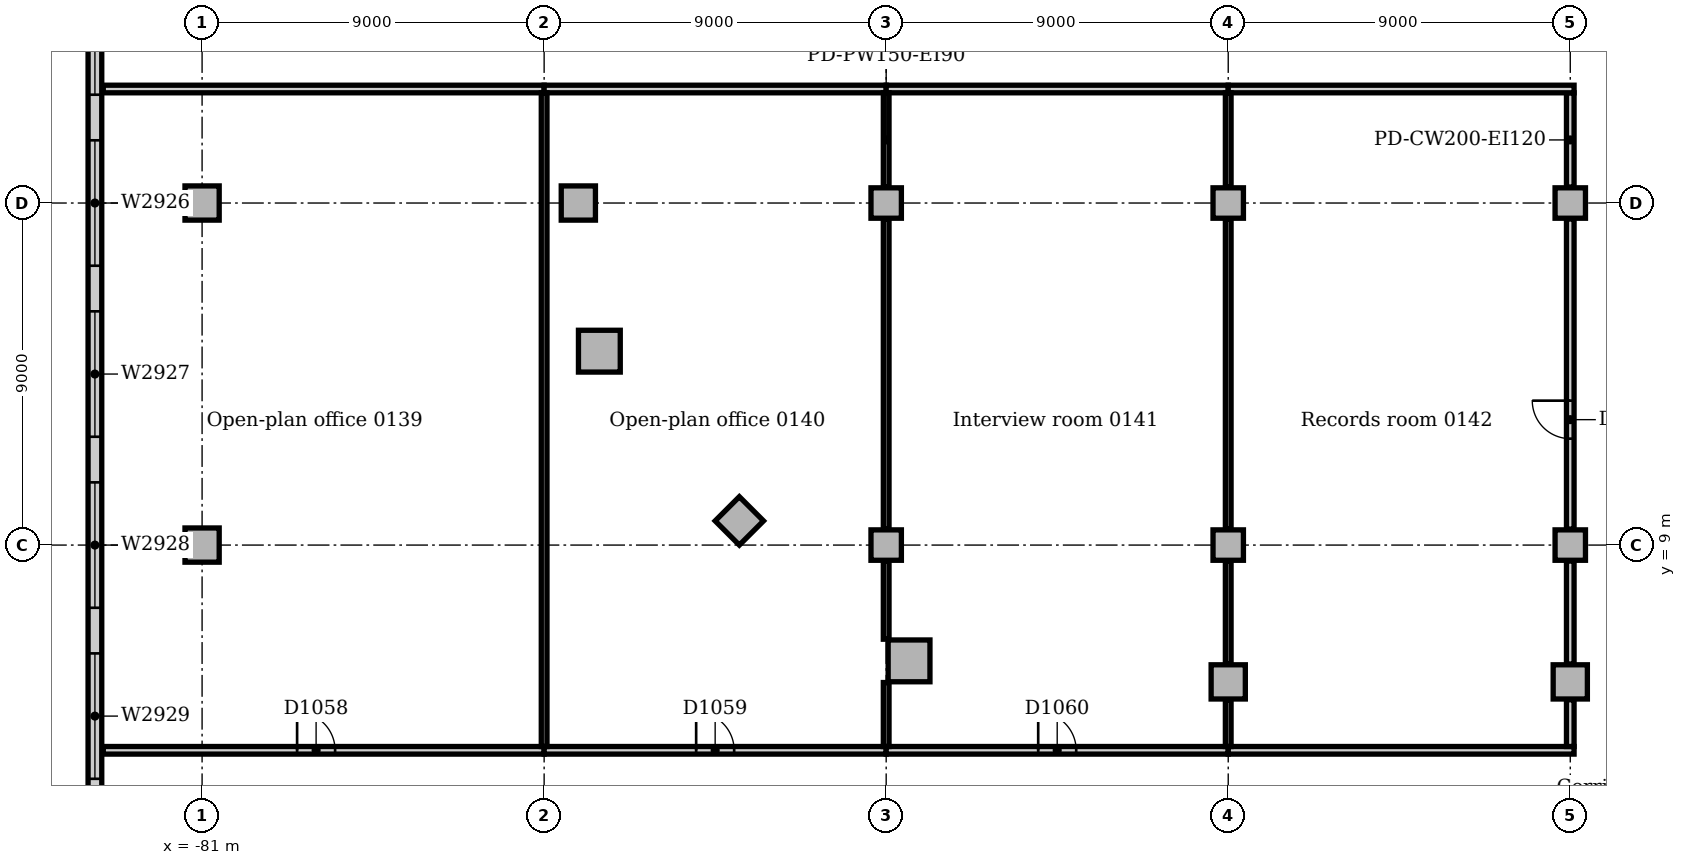
"""IFC4 building model, lengths in metres.
Left out: names, types, materials, properties, quantities, classifications, styles, units other than length and angle.
Written with IfcOpenShell. Run it as: python <this file> out.ifc"""

import sys

from ifc_helpers import new_model, si_unit, direction, frame, frame_2d, origin, origin_2d, place, context, subcontext, project, spatial, rectangle, extrude, element, fill, save


model = new_model("IFC4")
c1 = context("Model", 3, precision=1e-05, world=origin(), true_north=direction((0.0, 1.0)))
c2 = subcontext(c1, "Body", "Model", "MODEL_VIEW")
j1 = project(units=[si_unit("LENGTHUNIT", "METRE"), si_unit("PLANEANGLEUNIT", "RADIAN")], contexts=[c1])
p1 = place(None, origin())
s1 = spatial("IfcSite", under=j1, at=p1, CompositionType="ELEMENT")
p2 = place(p1, origin())
s2 = spatial("IfcBuilding", under=s1, at=p2, CompositionType="ELEMENT")
p3 = place(p2, frame((0.0, 0.0, 6.0)))
s3 = spatial("IfcBuildingStorey", under=s2, at=p3, CompositionType="ELEMENT", Elevation=6.0)
for number, where, z_axis, x_axis in (
    (1, (-62.398, 5.953, 0.0), (0.0, 0.0, 1.0), (1.0, 0.0, 0.0)),
    (2, (-70.547, 14.102, 0.0), (0.0, 0.0, 1.0), (1.0, 0.0, 0.0)),
):
    element("IfcColumn", number, at=place(p3, frame(where, z_axis=z_axis, x_axis=x_axis)), inside=s3, PredefinedType="COLUMN", context=c2, shape_type="SweptSolid", body=[
        extrude(rectangle(XDim=1.1, YDim=1.1, at=origin_2d()), origin(), (0.0, 0.0, 1.0), 4.7),
    ])
for number, where, z_axis, x_axis in (
    (3, (-54.0, 5.4, 0.0), (0.0, 0.0, 1.0), (1.0, 0.0, 0.0)),
    (4, (-45.0, 5.4, 0.0), (0.0, 0.0, 1.0), (1.0, 0.0, 0.0)),
    (5, (-71.1, 18.0, 0.0), (0.0, 0.0, 1.0), (1.0, 0.0, 0.0)),
    (6, (-66.864, 9.636, 0.0), (0.0, 0.0, 1.0), (0.707, 0.707, 0.0)),
):
    element("IfcColumn", number, at=place(p3, frame(where, z_axis=z_axis, x_axis=x_axis)), inside=s3, PredefinedType="COLUMN", context=c2, shape_type="SweptSolid", body=[
        extrude(rectangle(XDim=0.9, YDim=0.9, at=origin_2d()), origin(), (0.0, 0.0, 1.0), 4.7),
    ])
for number, where, z_axis, x_axis in (
    (7, (-63.0, 9.0, 0.0), (0.0, 0.0, 1.0), (1.0, 0.0, 0.0)),
    (8, (-63.0, 18.0, 0.0), (0.0, 0.0, 1.0), (1.0, 0.0, 0.0)),
    (9, (-54.0, 9.0, 0.0), (0.0, 0.0, 1.0), (1.0, 0.0, 0.0)),
    (10, (-54.0, 18.0, 0.0), (0.0, 0.0, 1.0), (1.0, 0.0, 0.0)),
    (11, (-45.0, 9.0, 0.0), (0.0, 0.0, 1.0), (1.0, 0.0, 0.0)),
    (12, (-45.0, 18.0, 0.0), (0.0, 0.0, 1.0), (1.0, 0.0, 0.0)),
):
    element("IfcColumn", number, at=place(p3, frame(where, z_axis=z_axis, x_axis=x_axis)), inside=s3, PredefinedType="COLUMN", context=c2, shape_type="SweptSolid", body=[
        extrude(rectangle(XDim=0.8, YDim=0.8, at=origin_2d()), origin(), (0.0, 0.0, 1.0), 4.7),
    ])
for number, where, z_axis, x_axis in (
    (13, (-81.0, 9.0, 0.0), (0.0, 0.0, 1.0), (1.0, 0.0, 0.0)),
    (14, (-81.0, 18.0, 0.0), (0.0, 0.0, 1.0), (1.0, 0.0, 0.0)),
):
    element("IfcColumn", number, at=place(p3, frame(where, z_axis=z_axis, x_axis=x_axis)), inside=s3, PredefinedType="COLUMN", context=c2, shape_type="SweptSolid", body=[
        extrude(rectangle(XDim=0.9, YDim=0.9, at=origin_2d()), origin(), (0.0, 0.0, 1.0), 4.7),
    ])
p4 = place(p3, frame((-83.82, 54.0, 0.0), z_axis=(0.0, 0.0, 1.0), x_axis=(0.0, -1.0, 0.0)))
e15 = element("IfcWall", 15, at=p4, inside=s3, PredefinedType="STANDARD", context=c2, shape_type="SweptSolid", body=[
    extrude(rectangle(XDim=63.0, YDim=0.36, at=frame_2d((31.5, 0.0))), origin(), (0.0, 0.0, 1.0), 4.7),
])
p5 = place(p4, frame((2.85, 0.0, 0.9)))
e16 = element("IfcOpeningElement", 16, at=p5, cuts=e15, PredefinedType="OPENING", context=c2, shape_type="SweptSolid", body=[
    extrude(rectangle(XDim=3.3, YDim=2.4, at=frame_2d((1.65, 1.2))), frame((0.0, 0.19, 0.0), z_axis=(0.0, -1.0, 0.0), x_axis=(1.0, 0.0, 0.0)), (0.0, 0.0, 1.0), 0.38),
])
p6 = place(p4, frame((7.35, 0.0, 0.9)))
e17 = element("IfcOpeningElement", 17, at=p6, cuts=e15, PredefinedType="OPENING", context=c2, shape_type="SweptSolid", body=[
    extrude(rectangle(XDim=3.3, YDim=2.4, at=frame_2d((1.65, 1.2))), frame((0.0, 0.19, 0.0), z_axis=(0.0, -1.0, 0.0), x_axis=(1.0, 0.0, 0.0)), (0.0, 0.0, 1.0), 0.38),
])
p7 = place(p4, frame((11.85, 0.0, 0.9)))
e18 = element("IfcOpeningElement", 18, at=p7, cuts=e15, PredefinedType="OPENING", context=c2, shape_type="SweptSolid", body=[
    extrude(rectangle(XDim=3.3, YDim=2.4, at=frame_2d((1.65, 1.2))), frame((0.0, 0.19, 0.0), z_axis=(0.0, -1.0, 0.0), x_axis=(1.0, 0.0, 0.0)), (0.0, 0.0, 1.0), 0.38),
])
p8 = place(p4, frame((16.35, 0.0, 0.9)))
e19 = element("IfcOpeningElement", 19, at=p8, cuts=e15, PredefinedType="OPENING", context=c2, shape_type="SweptSolid", body=[
    extrude(rectangle(XDim=3.3, YDim=2.4, at=frame_2d((1.65, 1.2))), frame((0.0, 0.19, 0.0), z_axis=(0.0, -1.0, 0.0), x_axis=(1.0, 0.0, 0.0)), (0.0, 0.0, 1.0), 0.38),
])
p9 = place(p4, frame((20.85, 0.0, 0.9)))
e20 = element("IfcOpeningElement", 20, at=p9, cuts=e15, PredefinedType="OPENING", context=c2, shape_type="SweptSolid", body=[
    extrude(rectangle(XDim=3.3, YDim=2.4, at=frame_2d((1.65, 1.2))), frame((0.0, 0.19, 0.0), z_axis=(0.0, -1.0, 0.0), x_axis=(1.0, 0.0, 0.0)), (0.0, 0.0, 1.0), 0.38),
])
p10 = place(p4, frame((25.35, 0.0, 0.9)))
e21 = element("IfcOpeningElement", 21, at=p10, cuts=e15, PredefinedType="OPENING", context=c2, shape_type="SweptSolid", body=[
    extrude(rectangle(XDim=3.3, YDim=2.4, at=frame_2d((1.65, 1.2))), frame((0.0, 0.19, 0.0), z_axis=(0.0, -1.0, 0.0), x_axis=(1.0, 0.0, 0.0)), (0.0, 0.0, 1.0), 0.38),
])
p11 = place(p4, frame((29.85, 0.0, 0.9)))
e22 = element("IfcOpeningElement", 22, at=p11, cuts=e15, PredefinedType="OPENING", context=c2, shape_type="SweptSolid", body=[
    extrude(rectangle(XDim=3.3, YDim=2.4, at=frame_2d((1.65, 1.2))), frame((0.0, 0.19, 0.0), z_axis=(0.0, -1.0, 0.0), x_axis=(1.0, 0.0, 0.0)), (0.0, 0.0, 1.0), 0.38),
])
p12 = place(p4, frame((34.35, 0.0, 0.9)))
e23 = element("IfcOpeningElement", 23, at=p12, cuts=e15, PredefinedType="OPENING", context=c2, shape_type="SweptSolid", body=[
    extrude(rectangle(XDim=3.3, YDim=2.4, at=frame_2d((1.65, 1.2))), frame((0.0, 0.19, 0.0), z_axis=(0.0, -1.0, 0.0), x_axis=(1.0, 0.0, 0.0)), (0.0, 0.0, 1.0), 0.38),
])
p13 = place(p4, frame((38.85, 0.0, 0.9)))
e24 = element("IfcOpeningElement", 24, at=p13, cuts=e15, PredefinedType="OPENING", context=c2, shape_type="SweptSolid", body=[
    extrude(rectangle(XDim=3.3, YDim=2.4, at=frame_2d((1.65, 1.2))), frame((0.0, 0.19, 0.0), z_axis=(0.0, -1.0, 0.0), x_axis=(1.0, 0.0, 0.0)), (0.0, 0.0, 1.0), 0.38),
])
p14 = place(p4, frame((43.35, 0.0, 0.9)))
e25 = element("IfcOpeningElement", 25, at=p14, cuts=e15, PredefinedType="OPENING", context=c2, shape_type="SweptSolid", body=[
    extrude(rectangle(XDim=3.3, YDim=2.4, at=frame_2d((1.65, 1.2))), frame((0.0, 0.19, 0.0), z_axis=(0.0, -1.0, 0.0), x_axis=(1.0, 0.0, 0.0)), (0.0, 0.0, 1.0), 0.38),
])
p15 = place(p4, frame((47.85, 0.0, 0.9)))
e26 = element("IfcOpeningElement", 26, at=p15, cuts=e15, PredefinedType="OPENING", context=c2, shape_type="SweptSolid", body=[
    extrude(rectangle(XDim=3.3, YDim=2.4, at=frame_2d((1.65, 1.2))), frame((0.0, 0.19, 0.0), z_axis=(0.0, -1.0, 0.0), x_axis=(1.0, 0.0, 0.0)), (0.0, 0.0, 1.0), 0.38),
])
p16 = place(p4, frame((52.35, 0.0, 0.9)))
e27 = element("IfcOpeningElement", 27, at=p16, cuts=e15, PredefinedType="OPENING", context=c2, shape_type="SweptSolid", body=[
    extrude(rectangle(XDim=3.3, YDim=2.4, at=frame_2d((1.65, 1.2))), frame((0.0, 0.19, 0.0), z_axis=(0.0, -1.0, 0.0), x_axis=(1.0, 0.0, 0.0)), (0.0, 0.0, 1.0), 0.38),
])
p17 = place(p4, frame((56.85, 0.0, 0.9)))
e28 = element("IfcOpeningElement", 28, at=p17, cuts=e15, PredefinedType="OPENING", context=c2, shape_type="SweptSolid", body=[
    extrude(rectangle(XDim=3.3, YDim=2.4, at=frame_2d((1.65, 1.2))), frame((0.0, 0.19, 0.0), z_axis=(0.0, -1.0, 0.0), x_axis=(1.0, 0.0, 0.0)), (0.0, 0.0, 1.0), 0.38),
])
p18 = place(p3, frame((-83.6, 3.6, 0.0), z_axis=(0.0, 0.0, 1.0), x_axis=(1.0, 0.0, 0.0)))
e29 = element("IfcWall", 29, at=p18, inside=s3, PredefinedType="PARTITIONING", context=c2, shape_type="SweptSolid", body=[
    extrude(rectangle(XDim=11.6, YDim=0.2, at=frame_2d((5.8, 0.0))), origin(), (0.0, 0.0, 1.0), 4.7),
])
p19 = place(p18, frame((5.1, 0.0, 0.0)))
e30 = element("IfcOpeningElement", 30, at=p19, cuts=e29, PredefinedType="OPENING", context=c2, shape_type="SweptSolid", body=[
    extrude(rectangle(XDim=1.0, YDim=2.1, at=frame_2d((0.5, 1.05))), frame((0.0, 0.11, 0.0), z_axis=(0.0, -1.0, 0.0), x_axis=(1.0, 0.0, 0.0)), (0.0, 0.0, 1.0), 0.22),
])
p20 = place(p3, frame((-72.0, 3.6, 0.0), z_axis=(0.0, 0.0, 1.0), x_axis=(1.0, 0.0, 0.0)))
e31 = element("IfcWall", 31, at=p20, inside=s3, PredefinedType="PARTITIONING", context=c2, shape_type="SweptSolid", body=[
    extrude(rectangle(XDim=9.0, YDim=0.2, at=frame_2d((4.5, 0.0))), origin(), (0.0, 0.0, 1.0), 4.7),
])
p21 = place(p20, frame((4.0, 0.0, 0.0)))
e32 = element("IfcOpeningElement", 32, at=p21, cuts=e31, PredefinedType="OPENING", context=c2, shape_type="SweptSolid", body=[
    extrude(rectangle(XDim=1.0, YDim=2.1, at=frame_2d((0.5, 1.05))), frame((0.0, 0.11, 0.0), z_axis=(0.0, -1.0, 0.0), x_axis=(1.0, 0.0, 0.0)), (0.0, 0.0, 1.0), 0.22),
])
p22 = place(p3, frame((-63.0, 3.6, 0.0), z_axis=(0.0, 0.0, 1.0), x_axis=(1.0, 0.0, 0.0)))
e33 = element("IfcWall", 33, at=p22, inside=s3, PredefinedType="PARTITIONING", context=c2, shape_type="SweptSolid", body=[
    extrude(rectangle(XDim=9.0, YDim=0.2, at=frame_2d((4.5, 0.0))), origin(), (0.0, 0.0, 1.0), 4.7),
])
p23 = place(p22, frame((4.0, 0.0, 0.0)))
e34 = element("IfcOpeningElement", 34, at=p23, cuts=e33, PredefinedType="OPENING", context=c2, shape_type="SweptSolid", body=[
    extrude(rectangle(XDim=1.0, YDim=2.1, at=frame_2d((0.5, 1.05))), frame((0.0, 0.11, 0.0), z_axis=(0.0, -1.0, 0.0), x_axis=(1.0, 0.0, 0.0)), (0.0, 0.0, 1.0), 0.22),
])
p24 = place(p3, frame((-54.0, 3.6, 0.0), z_axis=(0.0, 0.0, 1.0), x_axis=(1.0, 0.0, 0.0)))
e35 = element("IfcWall", 35, at=p24, inside=s3, PredefinedType="PARTITIONING", context=c2, shape_type="SweptSolid", body=[
    extrude(rectangle(XDim=9.1, YDim=0.2, at=frame_2d((4.55, 0.0))), origin(), (0.0, 0.0, 1.0), 4.7),
])
p25 = place(p3, frame((-45.0, 3.7, 0.0), z_axis=(0.0, 0.0, 1.0), x_axis=(0.0, 1.0, 0.0)))
e36 = element("IfcWall", 36, at=p25, inside=s3, PredefinedType="PARTITIONING", context=c2, shape_type="SweptSolid", body=[
    extrude(rectangle(XDim=1.23, YDim=0.2, at=frame_2d((0.615, 0.0))), origin(), (0.0, 0.0, 1.0), 4.7),
])
p26 = place(p3, frame((-45.0, 5.87, 0.0), z_axis=(0.0, 0.0, 1.0), x_axis=(0.0, 1.0, 0.0)))
e37 = element("IfcWall", 37, at=p26, inside=s3, PredefinedType="PARTITIONING", context=c2, shape_type="SweptSolid", body=[
    extrude(rectangle(XDim=2.71, YDim=0.2, at=frame_2d((1.355, 0.0))), origin(), (0.0, 0.0, 1.0), 4.7),
])
p27 = place(p3, frame((-45.0, 9.42, 0.0), z_axis=(0.0, 0.0, 1.0), x_axis=(0.0, 1.0, 0.0)))
e38 = element("IfcWall", 38, at=p27, inside=s3, PredefinedType="PARTITIONING", context=c2, shape_type="SweptSolid", body=[
    extrude(rectangle(XDim=8.16, YDim=0.2, at=frame_2d((4.08, 0.0))), origin(), (0.0, 0.0, 1.0), 4.7),
])
p28 = place(p27, frame((2.38, 0.0, 0.0)))
e39 = element("IfcOpeningElement", 39, at=p28, cuts=e38, PredefinedType="OPENING", context=c2, shape_type="SweptSolid", body=[
    extrude(rectangle(XDim=1.0, YDim=2.1, at=frame_2d((0.5, 1.05))), frame((0.0, 0.11, 0.0), z_axis=(0.0, -1.0, 0.0), x_axis=(1.0, 0.0, 0.0)), (0.0, 0.0, 1.0), 0.22),
])
p29 = place(p3, frame((-45.0, 18.42, 0.0), z_axis=(0.0, 0.0, 1.0), x_axis=(0.0, 1.0, 0.0)))
e40 = element("IfcWall", 40, at=p29, inside=s3, PredefinedType="PARTITIONING", context=c2, shape_type="SweptSolid", body=[
    extrude(rectangle(XDim=2.48, YDim=0.2, at=frame_2d((1.24, 0.0))), origin(), (0.0, 0.0, 1.0), 4.7),
])
p30 = place(p3, frame((-83.6, 21.0, 0.0), z_axis=(0.0, 0.0, 1.0), x_axis=(1.0, 0.0, 0.0)))
e41 = element("IfcWall", 41, at=p30, inside=s3, PredefinedType="PARTITIONING", context=c2, shape_type="SweptSolid", body=[
    extrude(rectangle(XDim=11.6, YDim=0.2, at=frame_2d((5.8, 0.0))), origin(), (0.0, 0.0, 1.0), 4.7),
])
for number, where, z_axis, x_axis in (
    (42, (-72.0, 21.0, 0.0), (0.0, 0.0, 1.0), (1.0, 0.0, 0.0)),
    (43, (-63.0, 21.0, 0.0), (0.0, 0.0, 1.0), (1.0, 0.0, 0.0)),
):
    element("IfcWall", number, at=place(p3, frame(where, z_axis=z_axis, x_axis=x_axis)), inside=s3, PredefinedType="PARTITIONING", context=c2, shape_type="SweptSolid", body=[
        extrude(rectangle(XDim=9.0, YDim=0.2, at=frame_2d((4.5, 0.0))), origin(), (0.0, 0.0, 1.0), 4.7),
    ])
p31 = place(p3, frame((-54.0, 21.0, 0.0), z_axis=(0.0, 0.0, 1.0), x_axis=(1.0, 0.0, 0.0)))
e44 = element("IfcWall", 44, at=p31, inside=s3, PredefinedType="PARTITIONING", context=c2, shape_type="SweptSolid", body=[
    extrude(rectangle(XDim=9.1, YDim=0.2, at=frame_2d((4.55, 0.0))), origin(), (0.0, 0.0, 1.0), 4.7),
])
p32 = place(p3, frame((-72.0, 3.7, 0.0), z_axis=(0.0, 0.0, 1.0), x_axis=(0.0, 1.0, 0.0)))
e45 = element("IfcWall", 45, at=p32, inside=s3, PredefinedType="PARTITIONING", context=c2, shape_type="SweptSolid", body=[
    extrude(rectangle(XDim=17.2, YDim=0.15, at=frame_2d((8.6, 0.0))), origin(), (0.0, 0.0, 1.0), 4.7),
])
p33 = place(p3, frame((-63.0, 3.7, 0.0), z_axis=(0.0, 0.0, 1.0), x_axis=(0.0, 1.0, 0.0)))
e46 = element("IfcWall", 46, at=p33, inside=s3, PredefinedType="PARTITIONING", context=c2, shape_type="SweptSolid", body=[
    extrude(rectangle(XDim=1.683, YDim=0.15, at=frame_2d((0.842, 0.0))), origin(), (0.0, 0.0, 1.0), 4.7),
])
p34 = place(p3, frame((-63.0, 6.523, 0.0), z_axis=(0.0, 0.0, 1.0), x_axis=(0.0, 1.0, 0.0)))
e47 = element("IfcWall", 47, at=p34, inside=s3, PredefinedType="PARTITIONING", context=c2, shape_type="SweptSolid", body=[
    extrude(rectangle(XDim=2.057, YDim=0.15, at=frame_2d((1.028, 0.0))), origin(), (0.0, 0.0, 1.0), 4.7),
])
p35 = place(p3, frame((-63.0, 9.42, 0.0), z_axis=(0.0, 0.0, 1.0), x_axis=(0.0, 1.0, 0.0)))
e48 = element("IfcWall", 48, at=p35, inside=s3, PredefinedType="PARTITIONING", context=c2, shape_type="SweptSolid", body=[
    extrude(rectangle(XDim=8.16, YDim=0.15, at=frame_2d((4.08, 0.0))), origin(), (0.0, 0.0, 1.0), 4.7),
])
p36 = place(p3, frame((-63.0, 18.42, 0.0), z_axis=(0.0, 0.0, 1.0), x_axis=(0.0, 1.0, 0.0)))
e49 = element("IfcWall", 49, at=p36, inside=s3, PredefinedType="PARTITIONING", context=c2, shape_type="SweptSolid", body=[
    extrude(rectangle(XDim=2.48, YDim=0.15, at=frame_2d((1.24, 0.0))), origin(), (0.0, 0.0, 1.0), 4.7),
])
p37 = place(p3, frame((-54.0, 3.7, 0.0), z_axis=(0.0, 0.0, 1.0), x_axis=(0.0, 1.0, 0.0)))
e50 = element("IfcWall", 50, at=p37, inside=s3, PredefinedType="PARTITIONING", context=c2, shape_type="SweptSolid", body=[
    extrude(rectangle(XDim=1.23, YDim=0.15, at=frame_2d((0.615, 0.0))), origin(), (0.0, 0.0, 1.0), 4.7),
])
p38 = place(p3, frame((-54.0, 5.87, 0.0), z_axis=(0.0, 0.0, 1.0), x_axis=(0.0, 1.0, 0.0)))
e51 = element("IfcWall", 51, at=p38, inside=s3, PredefinedType="PARTITIONING", context=c2, shape_type="SweptSolid", body=[
    extrude(rectangle(XDim=2.71, YDim=0.15, at=frame_2d((1.355, 0.0))), origin(), (0.0, 0.0, 1.0), 4.7),
])
p39 = place(p3, frame((-54.0, 9.42, 0.0), z_axis=(0.0, 0.0, 1.0), x_axis=(0.0, 1.0, 0.0)))
e52 = element("IfcWall", 52, at=p39, inside=s3, PredefinedType="PARTITIONING", context=c2, shape_type="SweptSolid", body=[
    extrude(rectangle(XDim=8.16, YDim=0.15, at=frame_2d((4.08, 0.0))), origin(), (0.0, 0.0, 1.0), 4.7),
])
p40 = place(p3, frame((-54.0, 18.42, 0.0), z_axis=(0.0, 0.0, 1.0), x_axis=(0.0, 1.0, 0.0)))
e53 = element("IfcWall", 53, at=p40, inside=s3, PredefinedType="PARTITIONING", context=c2, shape_type="SweptSolid", body=[
    extrude(rectangle(XDim=2.48, YDim=0.15, at=frame_2d((1.24, 0.0))), origin(), (0.0, 0.0, 1.0), 4.7),
])
p41 = place(p11, origin())
e54 = element("IfcWindow", 54, at=p41, inside=s3, PartitioningType="SINGLE_PANEL", PredefinedType="WINDOW", context=c2, shape_type="SweptSolid", body=[
    extrude(rectangle(XDim=3.3, YDim=2.4, at=frame_2d((1.65, 1.2))), frame((0.0, 0.13, 0.0), z_axis=(0.0, -1.0, 0.0), x_axis=(1.0, 0.0, 0.0)), (0.0, 0.0, 1.0), 0.06),
])
fill(e22, e54)
p42 = place(p12, origin())
e55 = element("IfcWindow", 55, at=p42, inside=s3, PartitioningType="SINGLE_PANEL", PredefinedType="WINDOW", context=c2, shape_type="SweptSolid", body=[
    extrude(rectangle(XDim=3.3, YDim=2.4, at=frame_2d((1.65, 1.2))), frame((0.0, 0.13, 0.0), z_axis=(0.0, -1.0, 0.0), x_axis=(1.0, 0.0, 0.0)), (0.0, 0.0, 1.0), 0.06),
])
fill(e23, e55)
p43 = place(p13, origin())
e56 = element("IfcWindow", 56, at=p43, inside=s3, PartitioningType="SINGLE_PANEL", PredefinedType="WINDOW", context=c2, shape_type="SweptSolid", body=[
    extrude(rectangle(XDim=3.3, YDim=2.4, at=frame_2d((1.65, 1.2))), frame((0.0, 0.13, 0.0), z_axis=(0.0, -1.0, 0.0), x_axis=(1.0, 0.0, 0.0)), (0.0, 0.0, 1.0), 0.06),
])
fill(e24, e56)
p44 = place(p14, origin())
e57 = element("IfcWindow", 57, at=p44, inside=s3, PartitioningType="SINGLE_PANEL", PredefinedType="WINDOW", context=c2, shape_type="SweptSolid", body=[
    extrude(rectangle(XDim=3.3, YDim=2.4, at=frame_2d((1.65, 1.2))), frame((0.0, 0.13, 0.0), z_axis=(0.0, -1.0, 0.0), x_axis=(1.0, 0.0, 0.0)), (0.0, 0.0, 1.0), 0.06),
])
fill(e25, e57)
p45 = place(p15, origin())
e58 = element("IfcWindow", 58, at=p45, inside=s3, PartitioningType="SINGLE_PANEL", PredefinedType="WINDOW", context=c2, shape_type="SweptSolid", body=[
    extrude(rectangle(XDim=3.3, YDim=2.4, at=frame_2d((1.65, 1.2))), frame((0.0, 0.13, 0.0), z_axis=(0.0, -1.0, 0.0), x_axis=(1.0, 0.0, 0.0)), (0.0, 0.0, 1.0), 0.06),
])
fill(e26, e58)
p46 = place(p19, origin())
e59 = element("IfcDoor", 59, at=p46, inside=s3, OperationType="SINGLE_SWING_LEFT", PredefinedType="DOOR", context=c2, shape_type="SweptSolid", body=[
    extrude(rectangle(XDim=1.0, YDim=2.1, at=frame_2d((0.5, 1.05))), frame((0.0, 0.025, 0.0), z_axis=(0.0, -1.0, 0.0), x_axis=(1.0, 0.0, 0.0)), (0.0, 0.0, 1.0), 0.05),
])
fill(e30, e59)
p47 = place(p21, origin())
e60 = element("IfcDoor", 60, at=p47, inside=s3, OperationType="SINGLE_SWING_LEFT", PredefinedType="DOOR", context=c2, shape_type="SweptSolid", body=[
    extrude(rectangle(XDim=1.0, YDim=2.1, at=frame_2d((0.5, 1.05))), frame((0.0, 0.025, 0.0), z_axis=(0.0, -1.0, 0.0), x_axis=(1.0, 0.0, 0.0)), (0.0, 0.0, 1.0), 0.05),
])
fill(e32, e60)
p48 = place(p23, origin())
e61 = element("IfcDoor", 61, at=p48, inside=s3, OperationType="SINGLE_SWING_LEFT", PredefinedType="DOOR", context=c2, shape_type="SweptSolid", body=[
    extrude(rectangle(XDim=1.0, YDim=2.1, at=frame_2d((0.5, 1.05))), frame((0.0, 0.025, 0.0), z_axis=(0.0, -1.0, 0.0), x_axis=(1.0, 0.0, 0.0)), (0.0, 0.0, 1.0), 0.05),
])
fill(e34, e61)
p49 = place(p28, origin())
e62 = element("IfcDoor", 62, at=p49, inside=s3, OperationType="SINGLE_SWING_RIGHT", PredefinedType="DOOR", context=c2, shape_type="SweptSolid", body=[
    extrude(rectangle(XDim=1.0, YDim=2.1, at=frame_2d((0.5, 1.05))), frame((0.0, 0.025, 0.0), z_axis=(0.0, -1.0, 0.0), x_axis=(1.0, 0.0, 0.0)), (0.0, 0.0, 1.0), 0.05),
])
fill(e39, e62)
save(model, sys.argv[1])
